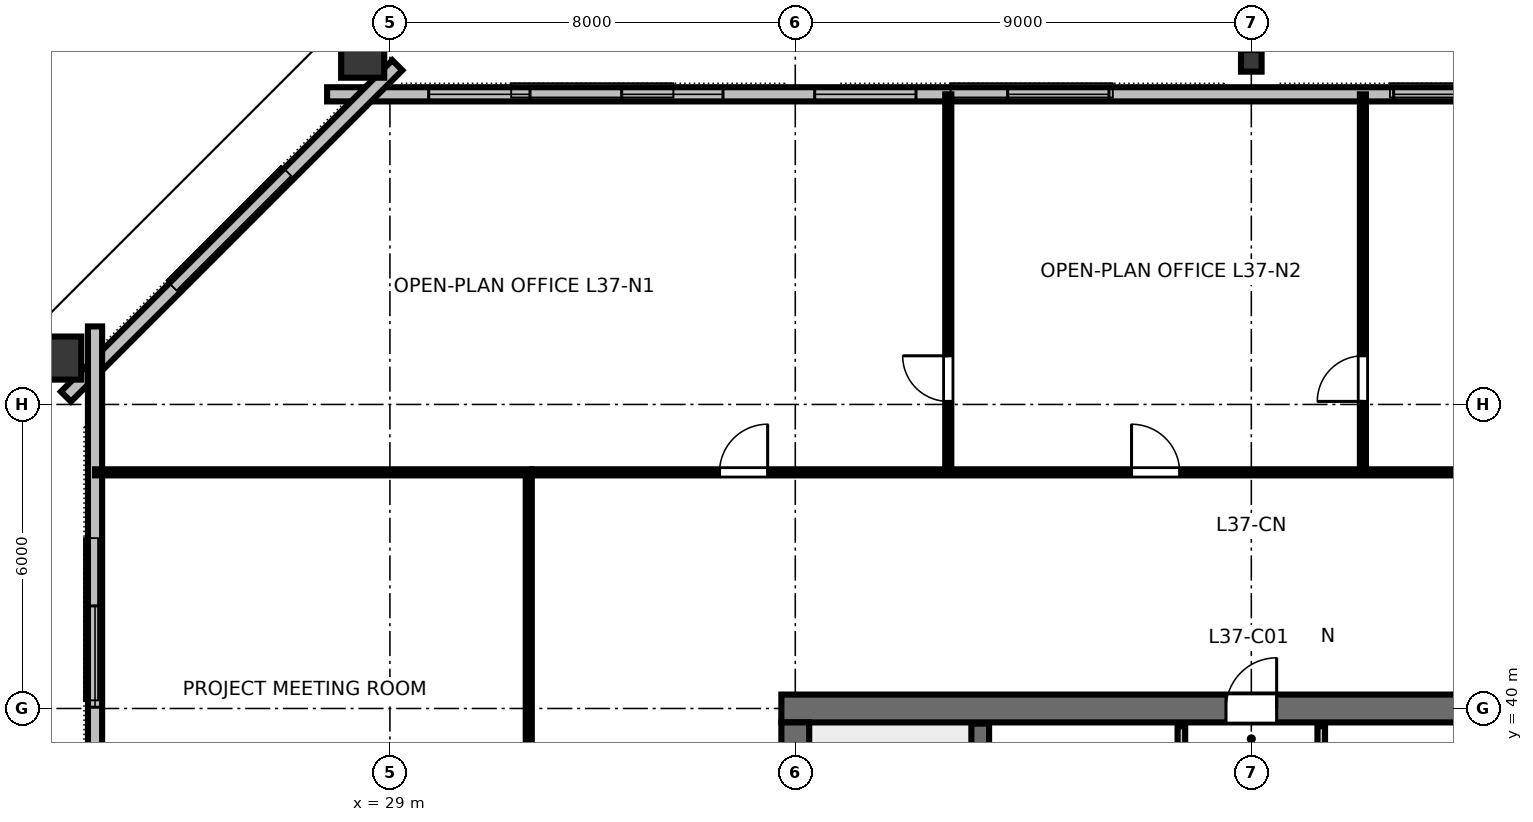
"""IFC4 building model, lengths in metres.
Left out: names, types, materials, properties, quantities, classifications, styles, units other than length and angle.
Written with IfcOpenShell. Run it as: python <this file> out.ifc"""

import sys

from ifc_helpers import new_model, si_unit, direction, frame, frame_2d, origin, origin_2d, place, context, subcontext, project, spatial, rectangle, hollow_rectangle, i_section, extrude, element, fill, save


model = new_model("IFC4")
c1 = context("Model", 3, precision=1e-05, world=origin(), true_north=direction((0.0, 1.0)))
c2 = subcontext(c1, "Body", "Model", "MODEL_VIEW")
j1 = project(units=[si_unit("LENGTHUNIT", "METRE"), si_unit("PLANEANGLEUNIT", "RADIAN")], contexts=[c1])
p1 = place(None, origin())
s1 = spatial("IfcSite", under=j1, at=p1, CompositionType="ELEMENT")
p2 = place(p1, origin())
s2 = spatial("IfcBuilding", under=s1, at=p2, CompositionType="ELEMENT")
p3 = place(p2, frame((0.0, 0.0, 142.0)))
s3 = spatial("IfcBuildingStorey", under=s2, at=p3, CompositionType="ELEMENT", Elevation=142.0)
p4 = place(p3, frame((36.725, 40.0, 0.0), z_axis=(0.0, 0.0, 1.0), x_axis=(1.0, 0.0, 0.0)))
e1 = element("IfcWall", 1, at=p4, inside=s3, PredefinedType="SHEAR", context=c2, shape_type="SweptSolid", body=[
    extrude(rectangle(XDim=18.55, YDim=0.55, at=frame_2d((9.275, 0.0))), origin(), (0.0, 0.0, 1.0), 3.36),
])
p5 = place(p4, frame((8.775, 0.0, 0.0)))
e2 = element("IfcOpeningElement", 2, at=p5, cuts=e1, PredefinedType="OPENING", context=c2, shape_type="SweptSolid", body=[
    extrude(rectangle(XDim=1.0, YDim=2.15, at=frame_2d((0.5, 1.075))), frame((0.0, 0.285, 0.0), z_axis=(0.0, -1.0, 0.0), x_axis=(1.0, 0.0, 0.0)), (0.0, 0.0, 1.0), 0.57),
])
p6 = place(p3, frame((37.0, 24.275, 0.0), z_axis=(0.0, 0.0, 1.0), x_axis=(0.0, 1.0, 0.0)))
e3 = element("IfcWall", 3, at=p6, inside=s3, PredefinedType="SHEAR", context=c2, shape_type="SweptSolid", body=[
    extrude(rectangle(XDim=15.45, YDim=0.55, at=frame_2d((7.725, 0.0))), origin(), (0.0, 0.0, 1.0), 3.36),
])
p7 = place(p6, frame((5.25, 0.0, 0.0)))
e4 = element("IfcOpeningElement", 4, at=p7, cuts=e3, PredefinedType="OPENING", context=c2, shape_type="SweptSolid", body=[
    extrude(rectangle(XDim=1.15, YDim=2.15, at=frame_2d((0.575, 1.075))), frame((0.0, 0.285, 0.0), z_axis=(0.0, -1.0, 0.0), x_axis=(1.0, 0.0, 0.0)), (0.0, 0.0, 1.0), 0.57),
])
p8 = place(p3, frame((46.0, 52.78, 0.0), z_axis=(0.0, 0.0, 1.0), x_axis=(1.0, 0.0, 0.0)))
e5 = element("IfcColumn", 5, at=p8, inside=s3, PredefinedType="COLUMN", context=c2, shape_type="SweptSolid", body=[
    extrude(i_section(OverallWidth=0.406, OverallDepth=0.425, WebThickness=0.033, FlangeThickness=0.052, FilletRadius=0.025, at=origin_2d()), origin(), (0.0, 0.0, 1.0), 3.358),
])
for number, where, z_axis, x_axis in (
    (6, (28.462, 52.948, 0.0), (0.0, 0.0, 1.0), (1.0, 0.0, 0.0)),
    (7, (22.409, 46.915, 0.0), (0.0, 0.0, 1.0), (0.0, 1.0, 0.0)),
):
    element("IfcColumn", number, at=place(p3, frame(where, z_axis=z_axis, x_axis=x_axis)), inside=s3, PredefinedType="COLUMN", context=c2, shape_type="SweptSolid", body=[
        extrude(hollow_rectangle(XDim=0.85, YDim=1.0, WallThickness=0.05, at=origin_2d()), origin(), (0.0, 0.0, 1.0), 3.358),
    ])
p9 = place(p3, frame((64.24, 52.12, 0.0), z_axis=(0.0, 0.0, 1.0), x_axis=(-1.0, 0.0, 0.0)))
e8 = element("IfcWall", 8, at=p9, inside=s3, PredefinedType="STANDARD", context=c2, shape_type="SweptSolid", body=[
    extrude(rectangle(XDim=36.48, YDim=0.28, at=frame_2d((18.24, 0.0))), origin(), (0.0, 0.0, 1.0), 3.36),
])
p10 = place(p9, frame((2.004, 0.0, 0.8)))
e9 = element("IfcOpeningElement", 9, at=p10, cuts=e8, PredefinedType="OPENING", context=c2, shape_type="SweptSolid", body=[
    extrude(rectangle(XDim=2.0, YDim=1.95, at=frame_2d((1.0, 0.975))), frame((0.0, 0.15, 0.0), z_axis=(0.0, -1.0, 0.0), x_axis=(1.0, 0.0, 0.0)), (0.0, 0.0, 1.0), 0.3),
])
p11 = place(p9, frame((5.813, 0.0, 0.8)))
e10 = element("IfcOpeningElement", 10, at=p11, cuts=e8, PredefinedType="OPENING", context=c2, shape_type="SweptSolid", body=[
    extrude(rectangle(XDim=2.0, YDim=1.95, at=frame_2d((1.0, 0.975))), frame((0.0, 0.15, 0.0), z_axis=(0.0, -1.0, 0.0), x_axis=(1.0, 0.0, 0.0)), (0.0, 0.0, 1.0), 0.3),
])
p12 = place(p9, frame((9.622, 0.0, 0.8)))
e11 = element("IfcOpeningElement", 11, at=p12, cuts=e8, PredefinedType="OPENING", context=c2, shape_type="SweptSolid", body=[
    extrude(rectangle(XDim=2.0, YDim=1.95, at=frame_2d((1.0, 0.975))), frame((0.0, 0.15, 0.0), z_axis=(0.0, -1.0, 0.0), x_axis=(1.0, 0.0, 0.0)), (0.0, 0.0, 1.0), 0.3),
])
p13 = place(p9, frame((13.431, 0.0, 0.8)))
e12 = element("IfcOpeningElement", 12, at=p13, cuts=e8, PredefinedType="OPENING", context=c2, shape_type="SweptSolid", body=[
    extrude(rectangle(XDim=2.0, YDim=1.95, at=frame_2d((1.0, 0.975))), frame((0.0, 0.15, 0.0), z_axis=(0.0, -1.0, 0.0), x_axis=(1.0, 0.0, 0.0)), (0.0, 0.0, 1.0), 0.3),
])
p14 = place(p9, frame((21.049, 0.0, 0.8)))
e13 = element("IfcOpeningElement", 13, at=p14, cuts=e8, PredefinedType="OPENING", context=c2, shape_type="SweptSolid", body=[
    extrude(rectangle(XDim=2.0, YDim=1.95, at=frame_2d((1.0, 0.975))), frame((0.0, 0.15, 0.0), z_axis=(0.0, -1.0, 0.0), x_axis=(1.0, 0.0, 0.0)), (0.0, 0.0, 1.0), 0.3),
])
p15 = place(p9, frame((24.858, 0.0, 0.8)))
e14 = element("IfcOpeningElement", 14, at=p15, cuts=e8, PredefinedType="OPENING", context=c2, shape_type="SweptSolid", body=[
    extrude(rectangle(XDim=2.0, YDim=1.95, at=frame_2d((1.0, 0.975))), frame((0.0, 0.15, 0.0), z_axis=(0.0, -1.0, 0.0), x_axis=(1.0, 0.0, 0.0)), (0.0, 0.0, 1.0), 0.3),
])
p16 = place(p9, frame((28.667, 0.0, 0.8)))
e15 = element("IfcOpeningElement", 15, at=p16, cuts=e8, PredefinedType="OPENING", context=c2, shape_type="SweptSolid", body=[
    extrude(rectangle(XDim=2.0, YDim=1.95, at=frame_2d((1.0, 0.975))), frame((0.0, 0.15, 0.0), z_axis=(0.0, -1.0, 0.0), x_axis=(1.0, 0.0, 0.0)), (0.0, 0.0, 1.0), 0.3),
])
p17 = place(p9, frame((32.476, 0.0, 0.8)))
e16 = element("IfcOpeningElement", 16, at=p17, cuts=e8, PredefinedType="OPENING", context=c2, shape_type="SweptSolid", body=[
    extrude(rectangle(XDim=2.0, YDim=1.95, at=frame_2d((1.0, 0.975))), frame((0.0, 0.15, 0.0), z_axis=(0.0, -1.0, 0.0), x_axis=(1.0, 0.0, 0.0)), (0.0, 0.0, 1.0), 0.3),
])
p18 = place(p3, frame((29.146, 52.694, 0.0), z_axis=(0.0, 0.0, 1.0), x_axis=(-0.707106781187, -0.707106781187, 0.0)))
e17 = element("IfcWall", 17, at=p18, inside=s3, PredefinedType="STANDARD", context=c2, shape_type="SweptSolid", body=[
    extrude(rectangle(XDim=9.248, YDim=0.28, at=frame_2d((4.624, 0.0))), origin(), (0.0, 0.0, 1.0), 3.36),
])
p19 = place(p3, frame((23.18, 47.54, 0.0), z_axis=(0.0, 0.0, 1.0), x_axis=(0.0, -1.0, 0.0)))
e18 = element("IfcWall", 18, at=p19, inside=s3, PredefinedType="STANDARD", context=c2, shape_type="SweptSolid", body=[
    extrude(rectangle(XDim=31.08, YDim=0.28, at=frame_2d((15.54, 0.0))), origin(), (0.0, 0.0, 1.0), 3.36),
])
p20 = place(p19, frame((11.86, 0.0, 0.0)))
e19 = element("IfcOpeningElement", 19, at=p20, cuts=e18, PredefinedType="OPENING", context=c2, shape_type="SweptSolid", body=[
    extrude(rectangle(XDim=1.4, YDim=2.15, at=frame_2d((0.7, 1.075))), frame((0.0, 0.15, 0.0), z_axis=(0.0, -1.0, 0.0), x_axis=(1.0, 0.0, 0.0)), (0.0, 0.0, 1.0), 0.3),
])
p21 = place(p19, frame((5.515, 0.0, 0.8)))
e20 = element("IfcOpeningElement", 20, at=p21, cuts=e18, PredefinedType="OPENING", context=c2, shape_type="SweptSolid", body=[
    extrude(rectangle(XDim=2.0, YDim=1.95, at=frame_2d((1.0, 0.975))), frame((0.0, 0.15, 0.0), z_axis=(0.0, -1.0, 0.0), x_axis=(1.0, 0.0, 0.0)), (0.0, 0.0, 1.0), 0.3),
])
p22 = place(p19, frame((9.125, 0.0, 0.8)))
e21 = element("IfcOpeningElement", 21, at=p22, cuts=e18, PredefinedType="OPENING", context=c2, shape_type="SweptSolid", body=[
    extrude(rectangle(XDim=2.0, YDim=1.95, at=frame_2d((1.0, 0.975))), frame((0.0, 0.15, 0.0), z_axis=(0.0, -1.0, 0.0), x_axis=(1.0, 0.0, 0.0)), (0.0, 0.0, 1.0), 0.3),
])
p23 = place(p19, frame((19.955, 0.0, 0.8)))
e22 = element("IfcOpeningElement", 22, at=p23, cuts=e18, PredefinedType="OPENING", context=c2, shape_type="SweptSolid", body=[
    extrude(rectangle(XDim=2.0, YDim=1.95, at=frame_2d((1.0, 0.975))), frame((0.0, 0.15, 0.0), z_axis=(0.0, -1.0, 0.0), x_axis=(1.0, 0.0, 0.0)), (0.0, 0.0, 1.0), 0.3),
])
p24 = place(p19, frame((23.565, 0.0, 0.8)))
e23 = element("IfcOpeningElement", 23, at=p24, cuts=e18, PredefinedType="OPENING", context=c2, shape_type="SweptSolid", body=[
    extrude(rectangle(XDim=2.0, YDim=1.95, at=frame_2d((1.0, 0.975))), frame((0.0, 0.15, 0.0), z_axis=(0.0, -1.0, 0.0), x_axis=(1.0, 0.0, 0.0)), (0.0, 0.0, 1.0), 0.3),
])
p25 = place(p3, frame((40.65, 32.0, 0.0), z_axis=(0.0, 0.0, 1.0), x_axis=(0.0, 1.0, 0.0)))
e24 = element("IfcWall", 24, at=p25, inside=s3, PredefinedType="SHEAR", context=c2, shape_type="SweptSolid", body=[
    extrude(rectangle(XDim=7.7, YDim=0.35, at=frame_2d((3.85, 0.0))), origin(), (0.0, 0.0, 1.0), 3.6),
])
p26 = place(p3, frame((44.62, 35.72, 0.0), z_axis=(0.0, 0.0, 1.0), x_axis=(0.0, 1.0, 0.0)))
e25 = element("IfcWall", 25, at=p26, inside=s3, PredefinedType="PARTITIONING", context=c2, shape_type="SweptSolid", body=[
    extrude(rectangle(XDim=3.93, YDim=0.15, at=frame_2d((1.965, 0.0))), origin(), (0.0, 0.0, 1.0), 3.36),
])
p27 = place(p26, frame((1.5, 0.0, 0.0)))
e26 = element("IfcOpeningElement", 26, at=p27, cuts=e25, PredefinedType="OPENING", context=c2, shape_type="SweptSolid", body=[
    extrude(rectangle(XDim=0.9, YDim=2.15, at=frame_2d((0.45, 1.075))), frame((0.0, 0.085, 0.0), z_axis=(0.0, -1.0, 0.0), x_axis=(1.0, 0.0, 0.0)), (0.0, 0.0, 1.0), 0.17),
])
p28 = place(p3, frame((47.38, 35.72, 0.0), z_axis=(0.0, 0.0, 1.0), x_axis=(0.0, 1.0, 0.0)))
e27 = element("IfcWall", 27, at=p28, inside=s3, PredefinedType="PARTITIONING", context=c2, shape_type="SweptSolid", body=[
    extrude(rectangle(XDim=3.93, YDim=0.15, at=frame_2d((1.965, 0.0))), origin(), (0.0, 0.0, 1.0), 3.36),
])
p29 = place(p28, frame((1.5, 0.0, 0.0)))
e28 = element("IfcOpeningElement", 28, at=p29, cuts=e27, PredefinedType="OPENING", context=c2, shape_type="SweptSolid", body=[
    extrude(rectangle(XDim=0.9, YDim=2.15, at=frame_2d((0.45, 1.075))), frame((0.0, 0.085, 0.0), z_axis=(0.0, -1.0, 0.0), x_axis=(1.0, 0.0, 0.0)), (0.0, 0.0, 1.0), 0.17),
])
p30 = place(p3, frame((40.019, 44.66, 0.0), z_axis=(0.0, 0.0, 1.0), x_axis=(0.0, 1.0, 0.0)))
e29 = element("IfcWall", 29, at=p30, inside=s3, PredefinedType="PARTITIONING", context=c2, shape_type="SweptSolid", body=[
    extrude(rectangle(XDim=7.46, YDim=0.12, at=frame_2d((3.73, 0.0))), origin(), (0.0, 0.0, 1.0), 2.64),
])
p31 = place(p30, frame((1.4, 0.0, 0.0)))
e30 = element("IfcOpeningElement", 30, at=p31, cuts=e29, PredefinedType="OPENING", context=c2, shape_type="SweptSolid", body=[
    extrude(rectangle(XDim=0.9, YDim=2.15, at=frame_2d((0.45, 1.075))), frame((0.0, 0.07, 0.0), z_axis=(0.0, -1.0, 0.0), x_axis=(1.0, 0.0, 0.0)), (0.0, 0.0, 1.0), 0.14),
])
p32 = place(p3, frame((48.202, 44.66, 0.0), z_axis=(0.0, 0.0, 1.0), x_axis=(0.0, 1.0, 0.0)))
e31 = element("IfcWall", 31, at=p32, inside=s3, PredefinedType="PARTITIONING", context=c2, shape_type="SweptSolid", body=[
    extrude(rectangle(XDim=7.46, YDim=0.12, at=frame_2d((3.73, 0.0))), origin(), (0.0, 0.0, 1.0), 2.64),
])
p33 = place(p32, frame((1.4, 0.0, 0.0)))
e32 = element("IfcOpeningElement", 32, at=p33, cuts=e31, PredefinedType="OPENING", context=c2, shape_type="SweptSolid", body=[
    extrude(rectangle(XDim=0.9, YDim=2.15, at=frame_2d((0.45, 1.075))), frame((0.0, 0.07, 0.0), z_axis=(0.0, -1.0, 0.0), x_axis=(1.0, 0.0, 0.0)), (0.0, 0.0, 1.0), 0.14),
])
p34 = place(p3, frame((31.8, 44.66, 0.0), z_axis=(0.0, 0.0, 1.0), x_axis=(1.0, 0.0, 0.0)))
e33 = element("IfcWall", 33, at=p34, inside=s3, PredefinedType="PARTITIONING", context=c2, shape_type="SweptSolid", body=[
    extrude(rectangle(XDim=28.4, YDim=0.12, at=frame_2d((14.2, 0.0))), origin(), (0.0, 0.0, 1.0), 2.64),
])
p35 = place(p34, frame((3.705, 0.0, 0.0)))
e34 = element("IfcOpeningElement", 34, at=p35, cuts=e33, PredefinedType="OPENING", context=c2, shape_type="SweptSolid", body=[
    extrude(rectangle(XDim=0.95, YDim=2.15, at=frame_2d((0.475, 1.075))), frame((0.0, 0.07, 0.0), z_axis=(0.0, -1.0, 0.0), x_axis=(1.0, 0.0, 0.0)), (0.0, 0.0, 1.0), 0.14),
])
p36 = place(p34, frame((11.836, 0.0, 0.0)))
e35 = element("IfcOpeningElement", 35, at=p36, cuts=e33, PredefinedType="OPENING", context=c2, shape_type="SweptSolid", body=[
    extrude(rectangle(XDim=0.95, YDim=2.15, at=frame_2d((0.475, 1.075))), frame((0.0, 0.07, 0.0), z_axis=(0.0, -1.0, 0.0), x_axis=(1.0, 0.0, 0.0)), (0.0, 0.0, 1.0), 0.14),
])
p37 = place(p34, frame((21.856, 0.0, 0.0)))
e36 = element("IfcOpeningElement", 36, at=p37, cuts=e33, PredefinedType="OPENING", context=c2, shape_type="SweptSolid", body=[
    extrude(rectangle(XDim=0.95, YDim=2.15, at=frame_2d((0.475, 1.075))), frame((0.0, 0.07, 0.0), z_axis=(0.0, -1.0, 0.0), x_axis=(1.0, 0.0, 0.0)), (0.0, 0.0, 1.0), 0.14),
])
p38 = place(p3, frame((31.74, 33.02, 0.0), z_axis=(0.0, 0.0, 1.0), x_axis=(0.0, 1.0, 0.0)))
e37 = element("IfcWall", 37, at=p38, inside=s3, PredefinedType="PARTITIONING", context=c2, shape_type="SweptSolid", body=[
    extrude(rectangle(XDim=11.58, YDim=0.12, at=frame_2d((5.79, 0.0))), origin(), (0.0, 0.0, 1.0), 2.64),
])
p39 = place(p38, frame((5.215, 0.0, 0.0)))
e38 = element("IfcOpeningElement", 38, at=p39, cuts=e37, PredefinedType="OPENING", context=c2, shape_type="SweptSolid", body=[
    extrude(rectangle(XDim=0.95, YDim=2.15, at=frame_2d((0.475, 1.075))), frame((0.0, 0.07, 0.0), z_axis=(0.0, -1.0, 0.0), x_axis=(1.0, 0.0, 0.0)), (0.0, 0.0, 1.0), 0.14),
])
p40 = place(p3, frame((31.8, 44.66, 0.0), z_axis=(0.0, 0.0, 1.0), x_axis=(-1.0, 0.0, 0.0)))
e39 = element("IfcWall", 39, at=p40, inside=s3, PredefinedType="PARTITIONING", context=c2, shape_type="SweptSolid", body=[
    extrude(rectangle(XDim=8.62, YDim=0.12, at=frame_2d((4.31, 0.0))), origin(), (0.0, 0.0, 1.0), 2.64),
])
p41 = place(p13, origin())
e40 = element("IfcWindow", 40, at=p41, inside=s3, PartitioningType="SINGLE_PANEL", PredefinedType="WINDOW", context=c2, shape_type="SweptSolid", body=[
    extrude(rectangle(XDim=2.0, YDim=1.95, at=frame_2d((1.0, 0.975))), frame((0.0, 0.03, 0.0), z_axis=(0.0, -1.0, 0.0), x_axis=(1.0, 0.0, 0.0)), (0.0, 0.0, 1.0), 0.06),
])
fill(e12, e40)
p42 = place(p14, origin())
e41 = element("IfcWindow", 41, at=p42, inside=s3, PartitioningType="SINGLE_PANEL", PredefinedType="WINDOW", context=c2, shape_type="SweptSolid", body=[
    extrude(rectangle(XDim=2.0, YDim=1.95, at=frame_2d((1.0, 0.975))), frame((0.0, 0.03, 0.0), z_axis=(0.0, -1.0, 0.0), x_axis=(1.0, 0.0, 0.0)), (0.0, 0.0, 1.0), 0.06),
])
fill(e13, e41)
p43 = place(p15, origin())
e42 = element("IfcWindow", 42, at=p43, inside=s3, PartitioningType="SINGLE_PANEL", PredefinedType="WINDOW", context=c2, shape_type="SweptSolid", body=[
    extrude(rectangle(XDim=2.0, YDim=1.95, at=frame_2d((1.0, 0.975))), frame((0.0, 0.03, 0.0), z_axis=(0.0, -1.0, 0.0), x_axis=(1.0, 0.0, 0.0)), (0.0, 0.0, 1.0), 0.06),
])
fill(e14, e42)
p44 = place(p16, origin())
e43 = element("IfcWindow", 43, at=p44, inside=s3, PartitioningType="SINGLE_PANEL", PredefinedType="WINDOW", context=c2, shape_type="SweptSolid", body=[
    extrude(rectangle(XDim=2.0, YDim=1.95, at=frame_2d((1.0, 0.975))), frame((0.0, 0.03, 0.0), z_axis=(0.0, -1.0, 0.0), x_axis=(1.0, 0.0, 0.0)), (0.0, 0.0, 1.0), 0.06),
])
fill(e15, e43)
p45 = place(p17, origin())
e44 = element("IfcWindow", 44, at=p45, inside=s3, PartitioningType="SINGLE_PANEL", PredefinedType="WINDOW", context=c2, shape_type="SweptSolid", body=[
    extrude(rectangle(XDim=2.0, YDim=1.95, at=frame_2d((1.0, 0.975))), frame((0.0, 0.03, 0.0), z_axis=(0.0, -1.0, 0.0), x_axis=(1.0, 0.0, 0.0)), (0.0, 0.0, 1.0), 0.06),
])
fill(e16, e44)
p46 = place(p21, origin())
e45 = element("IfcWindow", 45, at=p46, inside=s3, PartitioningType="SINGLE_PANEL", PredefinedType="WINDOW", context=c2, shape_type="SweptSolid", body=[
    extrude(rectangle(XDim=2.0, YDim=1.95, at=frame_2d((1.0, 0.975))), frame((0.0, 0.03, 0.0), z_axis=(0.0, -1.0, 0.0), x_axis=(1.0, 0.0, 0.0)), (0.0, 0.0, 1.0), 0.06),
])
fill(e20, e45)
p47 = place(p5, origin())
e46 = element("IfcDoor", 46, at=p47, inside=s3, OperationType="SINGLE_SWING_RIGHT", PredefinedType="DOOR", context=c2, shape_type="SweptSolid", body=[
    extrude(rectangle(XDim=1.0, YDim=2.15, at=frame_2d((0.5, 1.075))), frame((0.0, 0.025, 0.0), z_axis=(0.0, -1.0, 0.0), x_axis=(1.0, 0.0, 0.0)), (0.0, 0.0, 1.0), 0.05),
])
fill(e2, e46)
p48 = place(p31, origin())
e47 = element("IfcDoor", 47, at=p48, inside=s3, OperationType="SINGLE_SWING_RIGHT", PredefinedType="DOOR", context=c2, shape_type="SweptSolid", body=[
    extrude(rectangle(XDim=0.9, YDim=2.15, at=frame_2d((0.45, 1.075))), frame((0.0, 0.025, 0.0), z_axis=(0.0, -1.0, 0.0), x_axis=(1.0, 0.0, 0.0)), (0.0, 0.0, 1.0), 0.05),
])
fill(e30, e47)
p49 = place(p33, origin())
e48 = element("IfcDoor", 48, at=p49, inside=s3, OperationType="SINGLE_SWING_LEFT", PredefinedType="DOOR", context=c2, shape_type="SweptSolid", body=[
    extrude(rectangle(XDim=0.9, YDim=2.15, at=frame_2d((0.45, 1.075))), frame((0.0, 0.025, 0.0), z_axis=(0.0, -1.0, 0.0), x_axis=(1.0, 0.0, 0.0)), (0.0, 0.0, 1.0), 0.05),
])
fill(e32, e48)
p50 = place(p35, origin())
e49 = element("IfcDoor", 49, at=p50, inside=s3, OperationType="SINGLE_SWING_RIGHT", PredefinedType="DOOR", context=c2, shape_type="SweptSolid", body=[
    extrude(rectangle(XDim=0.95, YDim=2.15, at=frame_2d((0.475, 1.075))), frame((0.0, 0.025, 0.0), z_axis=(0.0, -1.0, 0.0), x_axis=(1.0, 0.0, 0.0)), (0.0, 0.0, 1.0), 0.05),
])
fill(e34, e49)
p51 = place(p36, origin())
e50 = element("IfcDoor", 50, at=p51, inside=s3, OperationType="SINGLE_SWING_LEFT", PredefinedType="DOOR", context=c2, shape_type="SweptSolid", body=[
    extrude(rectangle(XDim=0.95, YDim=2.15, at=frame_2d((0.475, 1.075))), frame((0.0, 0.025, 0.0), z_axis=(0.0, -1.0, 0.0), x_axis=(1.0, 0.0, 0.0)), (0.0, 0.0, 1.0), 0.05),
])
fill(e35, e50)
save(model, sys.argv[1])
